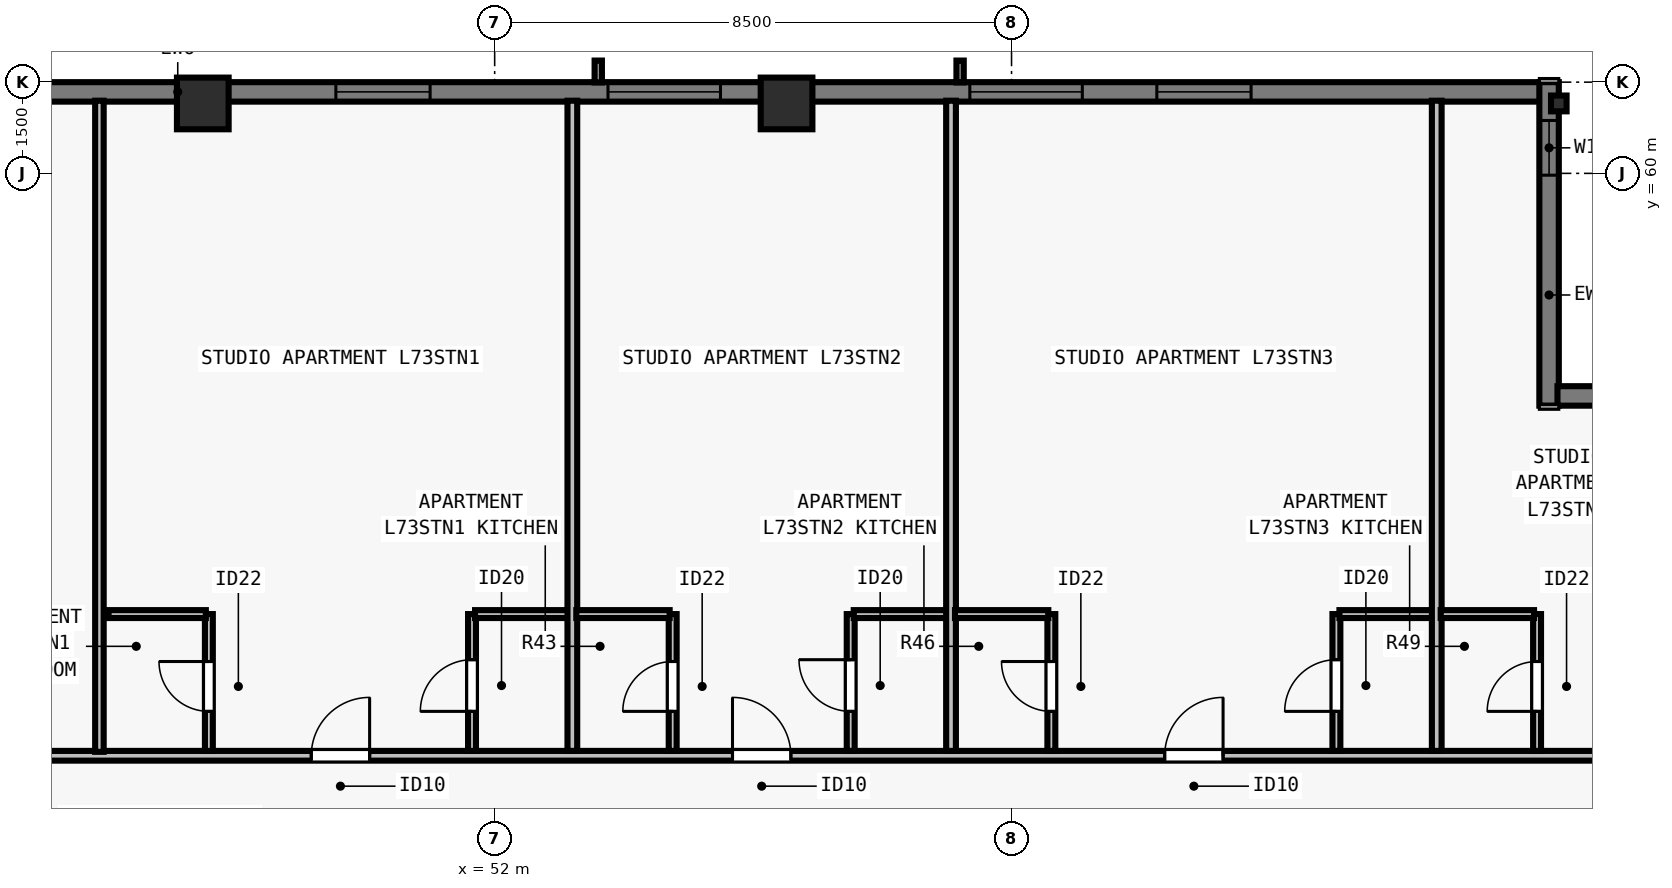
"""IFC4 building model, lengths in metres.
Left out: names, types, materials, properties, quantities, classifications, styles, units other than length and angle.
Written with IfcOpenShell. Run it as: python <this file> out.ifc"""

import sys

from ifc_helpers import new_model, si_unit, direction, frame, frame_2d, origin, origin_2d, place, context, subcontext, project, spatial, rectangle, i_section, extrude, element, fill, save


model = new_model("IFC4")
c1 = context("Model", 3, precision=1e-05, world=origin(), true_north=direction((0.0, 1.0)))
c2 = subcontext(c1, "Body", "Model", "MODEL_VIEW")
j1 = project(units=[si_unit("LENGTHUNIT", "METRE"), si_unit("PLANEANGLEUNIT", "RADIAN")], contexts=[c1])
p1 = place(None, origin())
s1 = spatial("IfcSite", under=j1, at=p1, CompositionType="ELEMENT")
p2 = place(p1, origin())
s2 = spatial("IfcBuilding", under=s1, at=p2, CompositionType="ELEMENT")
p3 = place(p2, frame((0.0, 0.0, 265.5)))
s3 = spatial("IfcBuildingStorey", under=s2, at=p3, CompositionType="ELEMENT", Elevation=265.5)
p4 = place(p3, frame((69.5, 61.15, 0.0), z_axis=(0.0, 0.0, 1.0), x_axis=(1.0, 0.0, 0.0)))
e1 = element("IfcColumn", 1, at=p4, inside=s3, PredefinedType="COLUMN", context=c2, shape_type="SweptSolid", body=[
    extrude(i_section(OverallWidth=0.256, OverallDepth=0.26, WebThickness=0.01, FlangeThickness=0.017, FilletRadius=0.013, at=origin_2d()), origin(), (0.0, 0.0, 1.0), 3.5),
])
for number, where, z_axis, x_axis in (
    (2, (56.8, 61.15, 0.0), (0.0, 0.0, 1.0), (1.0, 0.0, 0.0)),
    (3, (47.2, 61.15, 0.0), (0.0, 0.0, 1.0), (1.0, 0.0, 0.0)),
):
    element("IfcColumn", number, at=place(p3, frame(where, z_axis=z_axis, x_axis=x_axis)), inside=s3, PredefinedType="COLUMN", context=c2, shape_type="SweptSolid", body=[
        extrude(rectangle(XDim=0.85, YDim=0.85, at=origin_2d()), origin(), (0.0, 0.0, 1.0), 3.5),
    ])
p5 = place(p3, frame((34.5, 61.34, 0.0), z_axis=(0.0, 0.0, 1.0), x_axis=(1.0, 0.0, 0.0)))
e4 = element("IfcWall", 4, at=p5, inside=s3, PredefinedType="SOLIDWALL", context=c2, shape_type="SweptSolid", body=[
    extrude(rectangle(XDim=34.702, YDim=0.32, at=frame_2d((17.351, 0.0))), origin(), (0.0, 0.0, 1.0), 3.29),
])
p6 = place(p5, frame((4.613, 0.0, 0.8)))
e5 = element("IfcOpeningElement", 5, at=p6, cuts=e4, PredefinedType="OPENING", context=c2, shape_type="SweptSolid", body=[
    extrude(rectangle(XDim=1.85, YDim=1.678, at=frame_2d((0.925, 0.839))), frame((0.0, 0.17, 0.0), z_axis=(0.0, -1.0, 0.0), x_axis=(1.0, 0.0, 0.0)), (0.0, 0.0, 1.0), 0.34),
])
p7 = place(p5, frame((8.138, 0.0, 0.8)))
e6 = element("IfcOpeningElement", 6, at=p7, cuts=e4, PredefinedType="OPENING", context=c2, shape_type="SweptSolid", body=[
    extrude(rectangle(XDim=1.55, YDim=1.678, at=frame_2d((0.775, 0.839))), frame((0.0, 0.17, 0.0), z_axis=(0.0, -1.0, 0.0), x_axis=(1.0, 0.0, 0.0)), (0.0, 0.0, 1.0), 0.34),
])
p8 = place(p5, frame((14.888, 0.0, 0.8)))
e7 = element("IfcOpeningElement", 7, at=p8, cuts=e4, PredefinedType="OPENING", context=c2, shape_type="SweptSolid", body=[
    extrude(rectangle(XDim=1.55, YDim=1.678, at=frame_2d((0.775, 0.839))), frame((0.0, 0.17, 0.0), z_axis=(0.0, -1.0, 0.0), x_axis=(1.0, 0.0, 0.0)), (0.0, 0.0, 1.0), 0.34),
])
p9 = place(p5, frame((19.364, 0.0, 0.8)))
e8 = element("IfcOpeningElement", 8, at=p9, cuts=e4, PredefinedType="OPENING", context=c2, shape_type="SweptSolid", body=[
    extrude(rectangle(XDim=1.85, YDim=1.678, at=frame_2d((0.925, 0.839))), frame((0.0, 0.17, 0.0), z_axis=(0.0, -1.0, 0.0), x_axis=(1.0, 0.0, 0.0)), (0.0, 0.0, 1.0), 0.34),
])
p10 = place(p5, frame((25.314, 0.0, 0.8)))
e9 = element("IfcOpeningElement", 9, at=p10, cuts=e4, PredefinedType="OPENING", context=c2, shape_type="SweptSolid", body=[
    extrude(rectangle(XDim=1.85, YDim=1.678, at=frame_2d((0.925, 0.839))), frame((0.0, 0.17, 0.0), z_axis=(0.0, -1.0, 0.0), x_axis=(1.0, 0.0, 0.0)), (0.0, 0.0, 1.0), 0.34),
])
p11 = place(p5, frame((28.389, 0.0, 0.8)))
e10 = element("IfcOpeningElement", 10, at=p11, cuts=e4, PredefinedType="OPENING", context=c2, shape_type="SweptSolid", body=[
    extrude(rectangle(XDim=1.55, YDim=1.678, at=frame_2d((0.775, 0.839))), frame((0.0, 0.17, 0.0), z_axis=(0.0, -1.0, 0.0), x_axis=(1.0, 0.0, 0.0)), (0.0, 0.0, 1.0), 0.34),
])
p12 = place(p3, frame((69.34, 61.5, 0.0), z_axis=(0.0, 0.0, 1.0), x_axis=(0.0, -1.0, 0.0)))
e11 = element("IfcWall", 11, at=p12, inside=s3, PredefinedType="SOLIDWALL", context=c2, shape_type="SweptSolid", body=[
    extrude(rectangle(XDim=5.32, YDim=0.32, at=frame_2d((2.66, 0.0))), origin(), (0.0, 0.0, 1.0), 3.29),
])
p13 = place(p12, frame((0.63, 0.0, 0.8)))
e12 = element("IfcOpeningElement", 12, at=p13, cuts=e11, PredefinedType="OPENING", context=c2, shape_type="SweptSolid", body=[
    extrude(rectangle(XDim=0.9, YDim=1.678, at=frame_2d((0.45, 0.839))), frame((0.0, 0.17, 0.0), z_axis=(0.0, -1.0, 0.0), x_axis=(1.0, 0.0, 0.0)), (0.0, 0.0, 1.0), 0.34),
])
p14 = place(p3, frame((69.478, 56.34, 0.0), z_axis=(0.0, 0.0, 1.0), x_axis=(1.0, 0.0, 0.0)))
e13 = element("IfcWall", 13, at=p14, inside=s3, PredefinedType="SOLIDWALL", context=c2, shape_type="SweptSolid", body=[
    extrude(rectangle(XDim=4.724, YDim=0.32, at=frame_2d((2.362, 0.0))), origin(), (0.0, 0.0, 1.0), 3.29),
])
p15 = place(p3, frame((29.805, 50.423, 0.0), z_axis=(0.0, 0.0, 1.0), x_axis=(1.0, 0.0, 0.0)))
e14 = element("IfcWall", 14, at=p15, inside=s3, PredefinedType="PARTITIONING", context=c2, shape_type="SweptSolid", body=[
    extrude(rectangle(XDim=44.39, YDim=0.16, at=frame_2d((22.195, 0.0))), origin(), (0.0, 0.0, 1.0), 2.958),
])
p16 = place(p15, frame((5.465, 0.0, 0.0)))
e15 = element("IfcOpeningElement", 15, at=p16, cuts=e14, PredefinedType="OPENING", context=c2, shape_type="SweptSolid", body=[
    extrude(rectangle(XDim=0.96, YDim=2.12, at=frame_2d((0.48, 1.06))), frame((0.0, 0.09, 0.0), z_axis=(0.0, -1.0, 0.0), x_axis=(1.0, 0.0, 0.0)), (0.0, 0.0, 1.0), 0.18),
])
p17 = place(p15, frame((19.179, 0.0, 0.0)))
e16 = element("IfcOpeningElement", 16, at=p17, cuts=e14, PredefinedType="OPENING", context=c2, shape_type="SweptSolid", body=[
    extrude(rectangle(XDim=0.96, YDim=2.18, at=frame_2d((0.48, 1.09))), frame((0.0, 0.09, 0.0), z_axis=(0.0, -1.0, 0.0), x_axis=(1.0, 0.0, 0.0)), (0.0, 0.0, 1.0), 0.18),
])
p18 = place(p15, frame((26.106, 0.0, 0.0)))
e17 = element("IfcOpeningElement", 17, at=p18, cuts=e14, PredefinedType="OPENING", context=c2, shape_type="SweptSolid", body=[
    extrude(rectangle(XDim=0.96, YDim=2.18, at=frame_2d((0.48, 1.09))), frame((0.0, 0.09, 0.0), z_axis=(0.0, -1.0, 0.0), x_axis=(1.0, 0.0, 0.0)), (0.0, 0.0, 1.0), 0.18),
])
p19 = place(p15, frame((33.214, 0.0, 0.0)))
e18 = element("IfcOpeningElement", 18, at=p19, cuts=e14, PredefinedType="OPENING", context=c2, shape_type="SweptSolid", body=[
    extrude(rectangle(XDim=0.96, YDim=2.18, at=frame_2d((0.48, 1.09))), frame((0.0, 0.09, 0.0), z_axis=(0.0, -1.0, 0.0), x_axis=(1.0, 0.0, 0.0)), (0.0, 0.0, 1.0), 0.18),
])
p20 = place(p15, frame((40.501, 0.0, 0.0)))
e19 = element("IfcOpeningElement", 19, at=p20, cuts=e14, PredefinedType="OPENING", context=c2, shape_type="SweptSolid", body=[
    extrude(rectangle(XDim=0.96, YDim=2.18, at=frame_2d((0.48, 1.09))), frame((0.0, 0.09, 0.0), z_axis=(0.0, -1.0, 0.0), x_axis=(1.0, 0.0, 0.0)), (0.0, 0.0, 1.0), 0.18),
])
p21 = place(p3, frame((45.5, 50.488, 0.0), z_axis=(0.0, 0.0, 1.0), x_axis=(0.0, 1.0, 0.0)))
e20 = element("IfcWall", 20, at=p21, inside=s3, PredefinedType="PARTITIONING", context=c2, shape_type="SweptSolid", body=[
    extrude(rectangle(XDim=10.708, YDim=0.14, at=frame_2d((5.354, 0.0))), origin(), (0.0, 0.0, 1.0), 3.29),
])
p22 = place(p3, frame((47.3, 50.502, 0.0), z_axis=(0.0, 0.0, 1.0), x_axis=(0.0, 1.0, 0.0)))
e21 = element("IfcWall", 21, at=p22, inside=s3, PredefinedType="PLUMBINGWALL", context=c2, shape_type="SweptSolid", body=[
    extrude(rectangle(XDim=2.25, YDim=0.13, at=frame_2d((1.125, 0.0))), origin(), (0.0, 0.0, 1.0), 2.573),
])
p23 = place(p22, frame((0.65, 0.0, 0.0)))
e22 = element("IfcOpeningElement", 22, at=p23, cuts=e21, PredefinedType="OPENING", context=c2, shape_type="SweptSolid", body=[
    extrude(rectangle(XDim=0.82, YDim=2.1, at=frame_2d((0.41, 1.05))), frame((0.0, 0.075, 0.0), z_axis=(0.0, -1.0, 0.0), x_axis=(1.0, 0.0, 0.0)), (0.0, 0.0, 1.0), 0.15),
])
p24 = place(p3, frame((45.65, 52.752, 0.0), z_axis=(0.0, 0.0, 1.0), x_axis=(1.0, 0.0, 0.0)))
e23 = element("IfcWall", 23, at=p24, inside=s3, PredefinedType="PLUMBINGWALL", context=c2, shape_type="SweptSolid", body=[
    extrude(rectangle(XDim=1.6, YDim=0.13, at=frame_2d((0.8, 0.0))), origin(), (0.0, 0.0, 1.0), 3.29),
])
p25 = place(p3, frame((51.627, 50.502, 0.0), z_axis=(0.0, 0.0, 1.0), x_axis=(0.0, 1.0, 0.0)))
e24 = element("IfcWall", 24, at=p25, inside=s3, PredefinedType="PLUMBINGWALL", context=c2, shape_type="SweptSolid", body=[
    extrude(rectangle(XDim=2.25, YDim=0.13, at=frame_2d((1.125, 0.0))), origin(), (0.0, 0.0, 1.0), 3.29),
])
p26 = place(p25, frame((0.65, 0.0, 0.0)))
e25 = element("IfcOpeningElement", 25, at=p26, cuts=e24, PredefinedType="OPENING", context=c2, shape_type="SweptSolid", body=[
    extrude(rectangle(XDim=0.85, YDim=2.1, at=frame_2d((0.425, 1.05))), frame((0.0, 0.075, 0.0), z_axis=(0.0, -1.0, 0.0), x_axis=(1.0, 0.0, 0.0)), (0.0, 0.0, 1.0), 0.15),
])
p27 = place(p3, frame((51.677, 52.752, 0.0), z_axis=(0.0, 0.0, 1.0), x_axis=(1.0, 0.0, 0.0)))
e26 = element("IfcWall", 26, at=p27, inside=s3, PredefinedType="PLUMBINGWALL", context=c2, shape_type="SweptSolid", body=[
    extrude(rectangle(XDim=1.6, YDim=0.13, at=frame_2d((0.8, 0.0))), origin(), (0.0, 0.0, 1.0), 3.29),
])
p28 = place(p3, frame((53.278, 50.502, 0.0), z_axis=(0.0, 0.0, 1.0), x_axis=(0.0, 1.0, 0.0)))
e27 = element("IfcWall", 27, at=p28, inside=s3, PredefinedType="PARTITIONING", context=c2, shape_type="SweptSolid", body=[
    extrude(rectangle(XDim=10.693, YDim=0.16, at=frame_2d((5.346, 0.0))), origin(), (0.0, 0.0, 1.0), 2.958),
])
p29 = place(p3, frame((54.927, 50.502, 0.0), z_axis=(0.0, 0.0, 1.0), x_axis=(0.0, 1.0, 0.0)))
e28 = element("IfcWall", 28, at=p29, inside=s3, PredefinedType="PLUMBINGWALL", context=c2, shape_type="SweptSolid", body=[
    extrude(rectangle(XDim=2.25, YDim=0.13, at=frame_2d((1.125, 0.0))), origin(), (0.0, 0.0, 1.0), 3.29),
])
p30 = place(p29, frame((0.65, 0.0, 0.0)))
e29 = element("IfcOpeningElement", 29, at=p30, cuts=e28, PredefinedType="OPENING", context=c2, shape_type="SweptSolid", body=[
    extrude(rectangle(XDim=0.82, YDim=2.1, at=frame_2d((0.41, 1.05))), frame((0.0, 0.075, 0.0), z_axis=(0.0, -1.0, 0.0), x_axis=(1.0, 0.0, 0.0)), (0.0, 0.0, 1.0), 0.15),
])
p31 = place(p3, frame((53.343, 52.752, 0.0), z_axis=(0.0, 0.0, 1.0), x_axis=(1.0, 0.0, 0.0)))
e30 = element("IfcWall", 30, at=p31, inside=s3, PredefinedType="PLUMBINGWALL", context=c2, shape_type="SweptSolid", body=[
    extrude(rectangle(XDim=1.535, YDim=0.13, at=frame_2d((0.768, 0.0))), origin(), (0.0, 0.0, 1.0), 3.29),
])
p32 = place(p3, frame((57.855, 50.502, 0.0), z_axis=(0.0, 0.0, 1.0), x_axis=(0.0, 1.0, 0.0)))
e31 = element("IfcWall", 31, at=p32, inside=s3, PredefinedType="PLUMBINGWALL", context=c2, shape_type="SweptSolid", body=[
    extrude(rectangle(XDim=2.25, YDim=0.13, at=frame_2d((1.125, 0.0))), origin(), (0.0, 0.0, 1.0), 3.29),
])
p33 = place(p32, frame((0.65, 0.0, 0.0)))
e32 = element("IfcOpeningElement", 32, at=p33, cuts=e31, PredefinedType="OPENING", context=c2, shape_type="SweptSolid", body=[
    extrude(rectangle(XDim=0.85, YDim=2.1, at=frame_2d((0.425, 1.05))), frame((0.0, 0.075, 0.0), z_axis=(0.0, -1.0, 0.0), x_axis=(1.0, 0.0, 0.0)), (0.0, 0.0, 1.0), 0.15),
])
p34 = place(p3, frame((57.905, 52.752, 0.0), z_axis=(0.0, 0.0, 1.0), x_axis=(1.0, 0.0, 0.0)))
e33 = element("IfcWall", 33, at=p34, inside=s3, PredefinedType="PLUMBINGWALL", context=c2, shape_type="SweptSolid", body=[
    extrude(rectangle(XDim=1.6, YDim=0.13, at=frame_2d((0.8, 0.0))), origin(), (0.0, 0.0, 1.0), 3.29),
])
p35 = place(p3, frame((59.505, 50.502, 0.0), z_axis=(0.0, 0.0, 1.0), x_axis=(0.0, 1.0, 0.0)))
e34 = element("IfcWall", 34, at=p35, inside=s3, PredefinedType="PARTITIONING", context=c2, shape_type="SweptSolid", body=[
    extrude(rectangle(XDim=10.693, YDim=0.16, at=frame_2d((5.346, 0.0))), origin(), (0.0, 0.0, 1.0), 3.29),
])
p36 = place(p3, frame((61.155, 50.502, 0.0), z_axis=(0.0, 0.0, 1.0), x_axis=(0.0, 1.0, 0.0)))
e35 = element("IfcWall", 35, at=p36, inside=s3, PredefinedType="PLUMBINGWALL", context=c2, shape_type="SweptSolid", body=[
    extrude(rectangle(XDim=2.25, YDim=0.13, at=frame_2d((1.125, 0.0))), origin(), (0.0, 0.0, 1.0), 3.29),
])
p37 = place(p36, frame((0.65, 0.0, 0.0)))
e36 = element("IfcOpeningElement", 36, at=p37, cuts=e35, PredefinedType="OPENING", context=c2, shape_type="SweptSolid", body=[
    extrude(rectangle(XDim=0.82, YDim=2.1, at=frame_2d((0.41, 1.05))), frame((0.0, 0.075, 0.0), z_axis=(0.0, -1.0, 0.0), x_axis=(1.0, 0.0, 0.0)), (0.0, 0.0, 1.0), 0.15),
])
p38 = place(p3, frame((59.57, 52.752, 0.0), z_axis=(0.0, 0.0, 1.0), x_axis=(1.0, 0.0, 0.0)))
e37 = element("IfcWall", 37, at=p38, inside=s3, PredefinedType="PLUMBINGWALL", context=c2, shape_type="SweptSolid", body=[
    extrude(rectangle(XDim=1.535, YDim=0.13, at=frame_2d((0.768, 0.0))), origin(), (0.0, 0.0, 1.0), 3.29),
])
p39 = place(p3, frame((65.843, 50.502, 0.0), z_axis=(0.0, 0.0, 1.0), x_axis=(0.0, 1.0, 0.0)))
e38 = element("IfcWall", 38, at=p39, inside=s3, PredefinedType="PLUMBINGWALL", context=c2, shape_type="SweptSolid", body=[
    extrude(rectangle(XDim=2.25, YDim=0.13, at=frame_2d((1.125, 0.0))), origin(), (0.0, 0.0, 1.0), 3.29),
])
p40 = place(p39, frame((0.65, 0.0, 0.0)))
e39 = element("IfcOpeningElement", 39, at=p40, cuts=e38, PredefinedType="OPENING", context=c2, shape_type="SweptSolid", body=[
    extrude(rectangle(XDim=0.85, YDim=2.1, at=frame_2d((0.425, 1.05))), frame((0.0, 0.075, 0.0), z_axis=(0.0, -1.0, 0.0), x_axis=(1.0, 0.0, 0.0)), (0.0, 0.0, 1.0), 0.15),
])
p41 = place(p3, frame((65.893, 52.752, 0.0), z_axis=(0.0, 0.0, 1.0), x_axis=(1.0, 0.0, 0.0)))
e40 = element("IfcWall", 40, at=p41, inside=s3, PredefinedType="PLUMBINGWALL", context=c2, shape_type="SweptSolid", body=[
    extrude(rectangle(XDim=1.6, YDim=0.13, at=frame_2d((0.8, 0.0))), origin(), (0.0, 0.0, 1.0), 3.29),
])
p42 = place(p3, frame((67.492, 50.502, 0.0), z_axis=(0.0, 0.0, 1.0), x_axis=(0.0, 1.0, 0.0)))
e41 = element("IfcWall", 41, at=p42, inside=s3, PredefinedType="PARTITIONING", context=c2, shape_type="SweptSolid", body=[
    extrude(rectangle(XDim=10.693, YDim=0.16, at=frame_2d((5.346, 0.0))), origin(), (0.0, 0.0, 1.0), 2.573),
])
p43 = place(p3, frame((69.143, 50.502, 0.0), z_axis=(0.0, 0.0, 1.0), x_axis=(0.0, 1.0, 0.0)))
e42 = element("IfcWall", 42, at=p43, inside=s3, PredefinedType="PLUMBINGWALL", context=c2, shape_type="SweptSolid", body=[
    extrude(rectangle(XDim=2.25, YDim=0.13, at=frame_2d((1.125, 0.0))), origin(), (0.0, 0.0, 1.0), 3.29),
])
p44 = place(p43, frame((0.65, 0.0, 0.0)))
e43 = element("IfcOpeningElement", 43, at=p44, cuts=e42, PredefinedType="OPENING", context=c2, shape_type="SweptSolid", body=[
    extrude(rectangle(XDim=0.82, YDim=2.1, at=frame_2d((0.41, 1.05))), frame((0.0, 0.075, 0.0), z_axis=(0.0, -1.0, 0.0), x_axis=(1.0, 0.0, 0.0)), (0.0, 0.0, 1.0), 0.15),
])
p45 = place(p3, frame((67.558, 52.752, 0.0), z_axis=(0.0, 0.0, 1.0), x_axis=(1.0, 0.0, 0.0)))
e44 = element("IfcWall", 44, at=p45, inside=s3, PredefinedType="PLUMBINGWALL", context=c2, shape_type="SweptSolid", body=[
    extrude(rectangle(XDim=1.535, YDim=0.13, at=frame_2d((0.768, 0.0))), origin(), (0.0, 0.0, 1.0), 2.958),
])
p46 = place(p8, origin())
e45 = element("IfcWindow", 45, at=p46, inside=s3, PartitioningType="SINGLE_PANEL", PredefinedType="WINDOW", context=c2, shape_type="SweptSolid", body=[
    extrude(rectangle(XDim=1.55, YDim=1.678, at=frame_2d((0.775, 0.839))), frame((0.0, -0.05, 0.0), z_axis=(0.0, -1.0, 0.0), x_axis=(1.0, 0.0, 0.0)), (0.0, 0.0, 1.0), 0.06),
])
fill(e7, e45)
p47 = place(p9, origin())
e46 = element("IfcWindow", 46, at=p47, inside=s3, PartitioningType="SINGLE_PANEL", PredefinedType="WINDOW", context=c2, shape_type="SweptSolid", body=[
    extrude(rectangle(XDim=1.85, YDim=1.678, at=frame_2d((0.925, 0.839))), frame((0.0, -0.05, 0.0), z_axis=(0.0, -1.0, 0.0), x_axis=(1.0, 0.0, 0.0)), (0.0, 0.0, 1.0), 0.06),
])
fill(e8, e46)
p48 = place(p10, origin())
e47 = element("IfcWindow", 47, at=p48, inside=s3, PartitioningType="SINGLE_PANEL", PredefinedType="WINDOW", context=c2, shape_type="SweptSolid", body=[
    extrude(rectangle(XDim=1.85, YDim=1.678, at=frame_2d((0.925, 0.839))), frame((0.0, -0.05, 0.0), z_axis=(0.0, -1.0, 0.0), x_axis=(1.0, 0.0, 0.0)), (0.0, 0.0, 1.0), 0.06),
])
fill(e9, e47)
p49 = place(p11, origin())
e48 = element("IfcWindow", 48, at=p49, inside=s3, PartitioningType="SINGLE_PANEL", PredefinedType="WINDOW", context=c2, shape_type="SweptSolid", body=[
    extrude(rectangle(XDim=1.55, YDim=1.678, at=frame_2d((0.775, 0.839))), frame((0.0, -0.05, 0.0), z_axis=(0.0, -1.0, 0.0), x_axis=(1.0, 0.0, 0.0)), (0.0, 0.0, 1.0), 0.06),
])
fill(e10, e48)
p50 = place(p13, origin())
e49 = element("IfcWindow", 49, at=p50, inside=s3, PartitioningType="SINGLE_PANEL", PredefinedType="WINDOW", context=c2, shape_type="SweptSolid", body=[
    extrude(rectangle(XDim=0.9, YDim=1.678, at=frame_2d((0.45, 0.839))), frame((0.0, -0.04, 0.0), z_axis=(0.0, -1.0, 0.0), x_axis=(1.0, 0.0, 0.0)), (0.0, 0.0, 1.0), 0.06),
])
fill(e12, e49)
p51 = place(p23, origin())
e50 = element("IfcDoor", 50, at=p51, inside=s3, OperationType="SINGLE_SWING_RIGHT", PredefinedType="DOOR", context=c2, shape_type="SweptSolid", body=[
    extrude(rectangle(XDim=0.82, YDim=2.1, at=frame_2d((0.41, 1.05))), frame((0.0, 0.025, 0.0), z_axis=(0.0, -1.0, 0.0), x_axis=(1.0, 0.0, 0.0)), (0.0, 0.0, 1.0), 0.05),
])
fill(e22, e50)
p52 = place(p26, origin())
e51 = element("IfcDoor", 51, at=p52, inside=s3, OperationType="SINGLE_SWING_LEFT", PredefinedType="DOOR", context=c2, shape_type="SweptSolid", body=[
    extrude(rectangle(XDim=0.85, YDim=2.1, at=frame_2d((0.425, 1.05))), frame((0.0, 0.025, 0.0), z_axis=(0.0, -1.0, 0.0), x_axis=(1.0, 0.0, 0.0)), (0.0, 0.0, 1.0), 0.05),
])
fill(e25, e51)
p53 = place(p17, origin())
e52 = element("IfcDoor", 52, at=p53, inside=s3, OperationType="SINGLE_SWING_RIGHT", PredefinedType="DOOR", context=c2, shape_type="SweptSolid", body=[
    extrude(rectangle(XDim=0.96, YDim=2.18, at=frame_2d((0.48, 1.09))), frame((0.0, 0.025, 0.0), z_axis=(0.0, -1.0, 0.0), x_axis=(1.0, 0.0, 0.0)), (0.0, 0.0, 1.0), 0.05),
])
fill(e16, e52)
p54 = place(p30, origin())
e53 = element("IfcDoor", 53, at=p54, inside=s3, OperationType="SINGLE_SWING_LEFT", PredefinedType="DOOR", context=c2, shape_type="SweptSolid", body=[
    extrude(rectangle(XDim=0.82, YDim=2.1, at=frame_2d((0.41, 1.05))), frame((0.0, 0.025, 0.0), z_axis=(0.0, -1.0, 0.0), x_axis=(1.0, 0.0, 0.0)), (0.0, 0.0, 1.0), 0.05),
])
fill(e29, e53)
p55 = place(p33, origin())
e54 = element("IfcDoor", 54, at=p55, inside=s3, OperationType="SINGLE_SWING_RIGHT", PredefinedType="DOOR", context=c2, shape_type="SweptSolid", body=[
    extrude(rectangle(XDim=0.85, YDim=2.1, at=frame_2d((0.425, 1.05))), frame((0.0, 0.025, 0.0), z_axis=(0.0, -1.0, 0.0), x_axis=(1.0, 0.0, 0.0)), (0.0, 0.0, 1.0), 0.05),
])
fill(e32, e54)
p56 = place(p18, origin())
e55 = element("IfcDoor", 55, at=p56, inside=s3, OperationType="SINGLE_SWING_LEFT", PredefinedType="DOOR", context=c2, shape_type="SweptSolid", body=[
    extrude(rectangle(XDim=0.96, YDim=2.18, at=frame_2d((0.48, 1.09))), frame((0.0, 0.025, 0.0), z_axis=(0.0, -1.0, 0.0), x_axis=(1.0, 0.0, 0.0)), (0.0, 0.0, 1.0), 0.05),
])
fill(e17, e55)
p57 = place(p37, origin())
e56 = element("IfcDoor", 56, at=p57, inside=s3, OperationType="SINGLE_SWING_RIGHT", PredefinedType="DOOR", context=c2, shape_type="SweptSolid", body=[
    extrude(rectangle(XDim=0.82, YDim=2.1, at=frame_2d((0.41, 1.05))), frame((0.0, 0.025, 0.0), z_axis=(0.0, -1.0, 0.0), x_axis=(1.0, 0.0, 0.0)), (0.0, 0.0, 1.0), 0.05),
])
fill(e36, e56)
p58 = place(p40, origin())
e57 = element("IfcDoor", 57, at=p58, inside=s3, OperationType="SINGLE_SWING_LEFT", PredefinedType="DOOR", context=c2, shape_type="SweptSolid", body=[
    extrude(rectangle(XDim=0.85, YDim=2.1, at=frame_2d((0.425, 1.05))), frame((0.0, 0.025, 0.0), z_axis=(0.0, -1.0, 0.0), x_axis=(1.0, 0.0, 0.0)), (0.0, 0.0, 1.0), 0.05),
])
fill(e39, e57)
p59 = place(p19, origin())
e58 = element("IfcDoor", 58, at=p59, inside=s3, OperationType="SINGLE_SWING_RIGHT", PredefinedType="DOOR", context=c2, shape_type="SweptSolid", body=[
    extrude(rectangle(XDim=0.96, YDim=2.18, at=frame_2d((0.48, 1.09))), frame((0.0, 0.025, 0.0), z_axis=(0.0, -1.0, 0.0), x_axis=(1.0, 0.0, 0.0)), (0.0, 0.0, 1.0), 0.05),
])
fill(e18, e58)
p60 = place(p44, origin())
e59 = element("IfcDoor", 59, at=p60, inside=s3, OperationType="SINGLE_SWING_LEFT", PredefinedType="DOOR", context=c2, shape_type="SweptSolid", body=[
    extrude(rectangle(XDim=0.82, YDim=2.1, at=frame_2d((0.41, 1.05))), frame((0.0, 0.025, 0.0), z_axis=(0.0, -1.0, 0.0), x_axis=(1.0, 0.0, 0.0)), (0.0, 0.0, 1.0), 0.05),
])
fill(e43, e59)
save(model, sys.argv[1])
